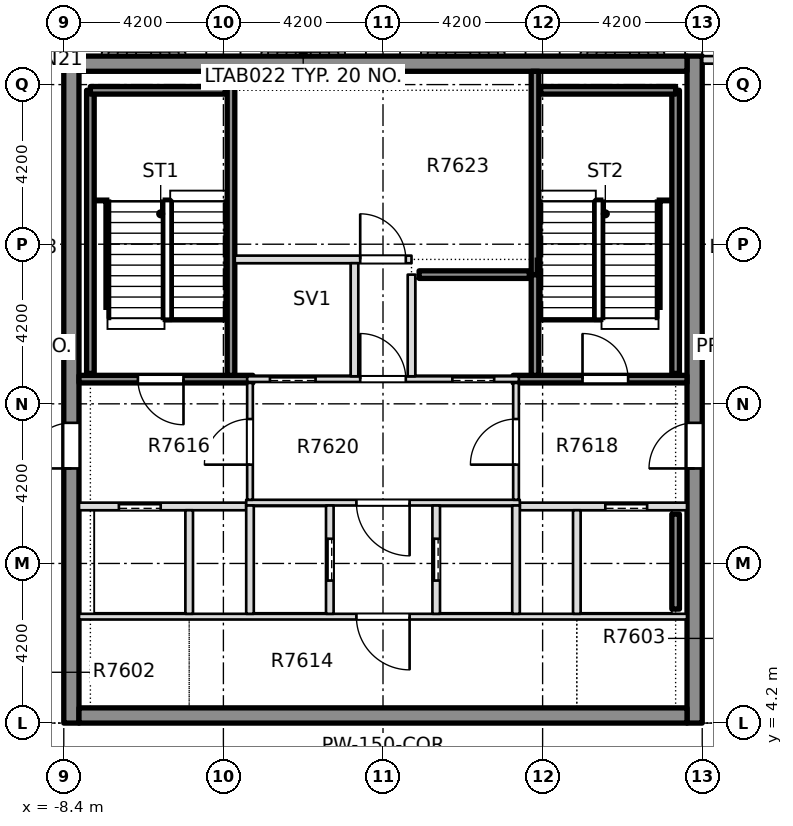
"""IFC4 building model, lengths in metres.
Left out: names, types, materials, properties, quantities, classifications, styles, units other than length and angle.
Written with IfcOpenShell. Run it as: python <this file> out.ifc"""

import sys

from ifc_helpers import new_model, si_unit, direction, frame, frame_2d, origin, place, context, subcontext, project, spatial, rectangle, extrude, element, fill, save


model = new_model("IFC4")
c1 = context("Model", 3, precision=1e-05, world=origin(), true_north=direction((0.0, 1.0)))
c2 = subcontext(c1, "Body", "Model", "MODEL_VIEW")
j1 = project(units=[si_unit("LENGTHUNIT", "METRE"), si_unit("PLANEANGLEUNIT", "RADIAN")], contexts=[c1])
p1 = place(None, origin())
s1 = spatial("IfcSite", under=j1, at=p1, CompositionType="ELEMENT")
p2 = place(p1, origin())
s2 = spatial("IfcBuilding", under=s1, at=p2, CompositionType="ELEMENT")
p3 = place(p2, frame((0.0, 0.0, 293.85)))
s3 = spatial("IfcBuildingStorey", under=s2, at=p3, CompositionType="ELEMENT", Elevation=293.85)
p4 = place(p3, frame((8.2, 4.2, -0.5), z_axis=(0.0, 0.0, 1.0), x_axis=(0.0, 1.0, 0.0)))
e1 = element("IfcWall", 1, at=p4, inside=s3, PredefinedType="SHEAR", context=c2, shape_type="SweptSolid", body=[
    extrude(rectangle(XDim=17.55, YDim=0.4, at=frame_2d((8.775, 0.0))), origin(), (0.0, 0.0, 1.0), 4.5),
])
p5 = place(p4, frame((6.7, 0.0, 0.5)))
e2 = element("IfcOpeningElement", 2, at=p5, cuts=e1, PredefinedType="OPENING", context=c2, shape_type="SweptSolid", body=[
    extrude(rectangle(XDim=1.2, YDim=2.1, at=frame_2d((0.6, 1.05))), frame((0.0, 0.21, 0.0), z_axis=(0.0, -1.0, 0.0), x_axis=(1.0, 0.0, 0.0)), (0.0, 0.0, 1.0), 0.42),
])
p6 = place(p3, frame((-8.2, 4.2, -0.5), z_axis=(0.0, 0.0, 1.0), x_axis=(0.0, 1.0, 0.0)))
e3 = element("IfcWall", 3, at=p6, inside=s3, PredefinedType="SHEAR", context=c2, shape_type="SweptSolid", body=[
    extrude(rectangle(XDim=17.55, YDim=0.4, at=frame_2d((8.775, 0.0))), origin(), (0.0, 0.0, 1.0), 4.5),
])
p7 = place(p6, frame((6.7, 0.0, 0.5)))
e4 = element("IfcOpeningElement", 4, at=p7, cuts=e3, PredefinedType="OPENING", context=c2, shape_type="SweptSolid", body=[
    extrude(rectangle(XDim=1.2, YDim=2.1, at=frame_2d((0.6, 1.05))), frame((0.0, 0.21, 0.0), z_axis=(0.0, -1.0, 0.0), x_axis=(1.0, 0.0, 0.0)), (0.0, 0.0, 1.0), 0.42),
])
for number, where, z_axis, x_axis in (
    (5, (-8.0, 4.4, -0.5), (0.0, 0.0, 1.0), (1.0, 0.0, 0.0)),
    (6, (-8.0, 21.55, -0.5), (0.0, 0.0, 1.0), (1.0, 0.0, 0.0)),
):
    element("IfcWall", number, at=place(p3, frame(where, z_axis=z_axis, x_axis=x_axis)), inside=s3, PredefinedType="SHEAR", context=c2, shape_type="SweptSolid", body=[
        extrude(rectangle(XDim=16.0, YDim=0.4, at=frame_2d((8.0, 0.0))), origin(), (0.0, 0.0, 1.0), 4.5),
    ])
for number, where, z_axis, x_axis in (
    (7, (9.6, 21.65, 0.0), (0.0, 0.0, 1.0), (-1.0, 0.0, 0.0)),
    (8, (-8.4, 21.65, 0.0), (0.0, 0.0, 1.0), (-1.0, 0.0, 0.0)),
):
    element("IfcWall", number, at=place(p3, frame(where, z_axis=z_axis, x_axis=x_axis)), inside=s3, PredefinedType="STANDARD", context=c2, shape_type="SweptSolid", body=[
        extrude(rectangle(XDim=1.2, YDim=0.2, at=frame_2d((0.6, 0.0))), origin(), (0.0, 0.0, 1.0), 4.0),
    ])
p8 = place(p3, frame((-7.999, 7.0, 0.0), z_axis=(0.0, 0.0, 1.0), x_axis=(1.0, 0.0, 0.0)))
e9 = element("IfcWall", 9, at=p8, inside=s3, PredefinedType="PARTITIONING", context=c2, shape_type="SweptSolid", body=[
    extrude(rectangle(XDim=15.998, YDim=0.15, at=frame_2d((7.999, 0.0))), origin(), (0.0, 0.0, 1.0), 4.0),
])
p9 = place(p8, frame((7.299, 0.0, 0.0)))
e10 = element("IfcOpeningElement", 10, at=p9, cuts=e9, PredefinedType="OPENING", context=c2, shape_type="SweptSolid", body=[
    extrude(rectangle(XDim=1.4, YDim=2.1, at=frame_2d((0.7, 1.05))), frame((0.0, 0.085, 0.0), z_axis=(0.0, -1.0, 0.0), x_axis=(1.0, 0.0, 0.0)), (0.0, 0.0, 1.0), 0.17),
])
p10 = place(p3, frame((-7.999, 9.9, 0.0), z_axis=(0.0, 0.0, 1.0), x_axis=(1.0, 0.0, 0.0)))
e11 = element("IfcWall", 11, at=p10, inside=s3, PredefinedType="PARTITIONING", context=c2, shape_type="SweptSolid", body=[
    extrude(rectangle(XDim=4.399, YDim=0.2, at=frame_2d((2.199, 0.0))), origin(), (0.0, 0.0, 1.0), 4.0),
])
p11 = place(p10, frame((1.049, 0.0, 0.0)))
e12 = element("IfcOpeningElement", 12, at=p11, cuts=e11, PredefinedType="OPENING", context=c2, shape_type="SweptSolid", body=[
    extrude(rectangle(XDim=1.1, YDim=2.1, at=frame_2d((0.55, 1.05))), frame((0.0, 0.11, 0.0), z_axis=(0.0, -1.0, 0.0), x_axis=(1.0, 0.0, 0.0)), (0.0, 0.0, 1.0), 0.22),
])
p12 = place(p3, frame((3.6, 9.9, 0.0), z_axis=(0.0, 0.0, 1.0), x_axis=(1.0, 0.0, 0.0)))
e13 = element("IfcWall", 13, at=p12, inside=s3, PredefinedType="PARTITIONING", context=c2, shape_type="SweptSolid", body=[
    extrude(rectangle(XDim=4.399, YDim=0.2, at=frame_2d((2.199, 0.0))), origin(), (0.0, 0.0, 1.0), 4.0),
])
p13 = place(p12, frame((2.25, 0.0, 0.0)))
e14 = element("IfcOpeningElement", 14, at=p13, cuts=e13, PredefinedType="OPENING", context=c2, shape_type="SweptSolid", body=[
    extrude(rectangle(XDim=1.1, YDim=2.1, at=frame_2d((0.55, 1.05))), frame((0.0, 0.11, 0.0), z_axis=(0.0, -1.0, 0.0), x_axis=(1.0, 0.0, 0.0)), (0.0, 0.0, 1.0), 0.22),
])
p14 = place(p3, frame((-3.6, 10.0, 0.0), z_axis=(0.0, 0.0, 1.0), x_axis=(1.0, 0.0, 0.0)))
e15 = element("IfcWall", 15, at=p14, inside=s3, PredefinedType="PARTITIONING", context=c2, shape_type="SweptSolid", body=[
    extrude(rectangle(XDim=7.2, YDim=0.15, at=frame_2d((3.6, 0.0))), origin(), (0.0, 0.0, 1.0), 4.0),
])
p15 = place(p14, frame((2.9, 0.0, 0.0)))
e16 = element("IfcOpeningElement", 16, at=p15, cuts=e15, PredefinedType="OPENING", context=c2, shape_type="SweptSolid", body=[
    extrude(rectangle(XDim=1.4, YDim=2.1, at=frame_2d((0.7, 1.05))), frame((0.0, 0.085, 0.0), z_axis=(0.0, -1.0, 0.0), x_axis=(1.0, 0.0, 0.0)), (0.0, 0.0, 1.0), 0.17),
])
p16 = place(p3, frame((-7.999, 13.25, 0.0), z_axis=(0.0, 0.0, 1.0), x_axis=(1.0, 0.0, 0.0)))
e17 = element("IfcWall", 17, at=p16, inside=s3, PredefinedType="SOLIDWALL", context=c2, shape_type="SweptSolid", body=[
    extrude(rectangle(XDim=4.574, YDim=0.2, at=frame_2d((2.287, 0.0))), origin(), (0.0, 0.0, 1.0), 4.0),
])
p17 = place(p16, frame((1.549, 0.0, 0.0)))
e18 = element("IfcOpeningElement", 18, at=p17, cuts=e17, PredefinedType="OPENING", context=c2, shape_type="SweptSolid", body=[
    extrude(rectangle(XDim=1.2, YDim=2.1, at=frame_2d((0.6, 1.05))), frame((0.0, 0.11, 0.0), z_axis=(0.0, -1.0, 0.0), x_axis=(1.0, 0.0, 0.0)), (0.0, 0.0, 1.0), 0.22),
])
p18 = place(p3, frame((-3.575, 13.25, 0.0), z_axis=(0.0, 0.0, 1.0), x_axis=(1.0, 0.0, 0.0)))
e19 = element("IfcWall", 19, at=p18, inside=s3, PredefinedType="PARTITIONING", context=c2, shape_type="SweptSolid", body=[
    extrude(rectangle(XDim=7.15, YDim=0.15, at=frame_2d((3.575, 0.0))), origin(), (0.0, 0.0, 1.0), 4.0),
])
p19 = place(p18, frame((0.6, 0.0, 0.0)))
e20 = element("IfcOpeningElement", 20, at=p19, cuts=e19, PredefinedType="OPENING", context=c2, shape_type="SweptSolid", body=[
    extrude(rectangle(XDim=1.2, YDim=2.1, at=frame_2d((0.6, 1.05))), frame((0.0, 0.085, 0.0), z_axis=(0.0, -1.0, 0.0), x_axis=(1.0, 0.0, 0.0)), (0.0, 0.0, 1.0), 0.17),
])
p20 = place(p18, frame((5.4, 0.0, 0.0)))
e21 = element("IfcOpeningElement", 21, at=p20, cuts=e19, PredefinedType="OPENING", context=c2, shape_type="SweptSolid", body=[
    extrude(rectangle(XDim=1.1, YDim=2.1, at=frame_2d((0.55, 1.05))), frame((0.0, 0.085, 0.0), z_axis=(0.0, -1.0, 0.0), x_axis=(1.0, 0.0, 0.0)), (0.0, 0.0, 1.0), 0.17),
])
p21 = place(p18, frame((2.975, 0.0, 0.0)))
e22 = element("IfcOpeningElement", 22, at=p21, cuts=e19, PredefinedType="OPENING", context=c2, shape_type="SweptSolid", body=[
    extrude(rectangle(XDim=1.2, YDim=2.1, at=frame_2d((0.6, 1.05))), frame((0.0, 0.085, 0.0), z_axis=(0.0, -1.0, 0.0), x_axis=(1.0, 0.0, 0.0)), (0.0, 0.0, 1.0), 0.17),
])
p22 = place(p3, frame((3.425, 13.25, 0.0), z_axis=(0.0, 0.0, 1.0), x_axis=(1.0, 0.0, 0.0)))
e23 = element("IfcWall", 23, at=p22, inside=s3, PredefinedType="SOLIDWALL", context=c2, shape_type="SweptSolid", body=[
    extrude(rectangle(XDim=4.574, YDim=0.2, at=frame_2d((2.287, 0.0))), origin(), (0.0, 0.0, 1.0), 4.0),
])
p23 = place(p22, frame((1.825, 0.0, 0.0)))
e24 = element("IfcOpeningElement", 24, at=p23, cuts=e23, PredefinedType="OPENING", context=c2, shape_type="SweptSolid", body=[
    extrude(rectangle(XDim=1.2, YDim=2.1, at=frame_2d((0.6, 1.05))), frame((0.0, 0.11, 0.0), z_axis=(0.0, -1.0, 0.0), x_axis=(1.0, 0.0, 0.0)), (0.0, 0.0, 1.0), 0.22),
])
p24 = place(p3, frame((-3.9, 16.4, 0.0), z_axis=(0.0, 0.0, 1.0), x_axis=(1.0, 0.0, 0.0)))
e25 = element("IfcWall", 25, at=p24, inside=s3, PredefinedType="PARTITIONING", context=c2, shape_type="SweptSolid", body=[
    extrude(rectangle(XDim=4.65, YDim=0.2, at=frame_2d((2.325, 0.0))), origin(), (0.0, 0.0, 1.0), 4.0),
])
p25 = place(p24, frame((3.3, 0.0, 0.0)))
e26 = element("IfcOpeningElement", 26, at=p25, cuts=e25, PredefinedType="OPENING", context=c2, shape_type="SweptSolid", body=[
    extrude(rectangle(XDim=1.2, YDim=2.1, at=frame_2d((0.6, 1.05))), frame((0.0, 0.11, 0.0), z_axis=(0.0, -1.0, 0.0), x_axis=(1.0, 0.0, 0.0)), (0.0, 0.0, 1.0), 0.22),
])
p26 = place(p3, frame((-5.1, 7.075, 0.0), z_axis=(0.0, 0.0, 1.0), x_axis=(0.0, 1.0, 0.0)))
e27 = element("IfcWall", 27, at=p26, inside=s3, PredefinedType="PARTITIONING", context=c2, shape_type="SweptSolid", body=[
    extrude(rectangle(XDim=2.725, YDim=0.2, at=frame_2d((1.363, 0.0))), origin(), (0.0, 0.0, 1.0), 4.0),
])
p27 = place(p3, frame((-4.0, 13.35, 0.0), z_axis=(0.0, 0.0, 1.0), x_axis=(0.0, 1.0, 0.0)))
e28 = element("IfcWall", 28, at=p27, inside=s3, PredefinedType="SOLIDWALL", context=c2, shape_type="SweptSolid", body=[
    extrude(rectangle(XDim=7.999, YDim=0.2, at=frame_2d((4.0, 0.0))), origin(), (0.0, 0.0, 1.0), 4.0),
])
p28 = place(p3, frame((-3.5, 7.075, 0.0), z_axis=(0.0, 0.0, 1.0), x_axis=(0.0, 1.0, 0.0)))
e29 = element("IfcWall", 29, at=p28, inside=s3, PredefinedType="PARTITIONING", context=c2, shape_type="SweptSolid", body=[
    extrude(rectangle(XDim=2.85, YDim=0.2, at=frame_2d((1.425, 0.0))), origin(), (0.0, 0.0, 1.0), 4.0),
])
p29 = place(p3, frame((-3.5, 10.075, 0.0), z_axis=(0.0, 0.0, 1.0), x_axis=(0.0, 1.0, 0.0)))
e30 = element("IfcWall", 30, at=p29, inside=s3, PredefinedType="PARTITIONING", context=c2, shape_type="SweptSolid", body=[
    extrude(rectangle(XDim=3.075, YDim=0.15, at=frame_2d((1.538, 0.0))), origin(), (0.0, 0.0, 1.0), 4.0),
])
p30 = place(p29, frame((0.925, 0.0, 0.0)))
e31 = element("IfcOpeningElement", 31, at=p30, cuts=e30, PredefinedType="OPENING", context=c2, shape_type="SweptSolid", body=[
    extrude(rectangle(XDim=1.2, YDim=2.1, at=frame_2d((0.6, 1.05))), frame((0.0, 0.085, 0.0), z_axis=(0.0, -1.0, 0.0), x_axis=(1.0, 0.0, 0.0)), (0.0, 0.0, 1.0), 0.17),
])
p31 = place(p3, frame((-1.4, 7.075, 0.0), z_axis=(0.0, 0.0, 1.0), x_axis=(0.0, 1.0, 0.0)))
e32 = element("IfcWall", 32, at=p31, inside=s3, PredefinedType="PARTITIONING", context=c2, shape_type="SweptSolid", body=[
    extrude(rectangle(XDim=2.85, YDim=0.2, at=frame_2d((1.425, 0.0))), origin(), (0.0, 0.0, 1.0), 4.0),
])
p32 = place(p31, frame((0.875, 0.0, 0.0)))
e33 = element("IfcOpeningElement", 33, at=p32, cuts=e32, PredefinedType="OPENING", context=c2, shape_type="SweptSolid", body=[
    extrude(rectangle(XDim=1.1, YDim=2.1, at=frame_2d((0.55, 1.05))), frame((0.0, 0.11, 0.0), z_axis=(0.0, -1.0, 0.0), x_axis=(1.0, 0.0, 0.0)), (0.0, 0.0, 1.0), 0.22),
])
p33 = place(p3, frame((-0.75, 13.325, 0.0), z_axis=(0.0, 0.0, 1.0), x_axis=(0.0, 1.0, 0.0)))
e34 = element("IfcWall", 34, at=p33, inside=s3, PredefinedType="PARTITIONING", context=c2, shape_type="SweptSolid", body=[
    extrude(rectangle(XDim=2.975, YDim=0.2, at=frame_2d((1.488, 0.0))), origin(), (0.0, 0.0, 1.0), 4.0),
])
p34 = place(p3, frame((0.75, 13.325, 0.0), z_axis=(0.0, 0.0, 1.0), x_axis=(0.0, 1.0, 0.0)))
e35 = element("IfcWall", 35, at=p34, inside=s3, PredefinedType="PARTITIONING", context=c2, shape_type="SweptSolid", body=[
    extrude(rectangle(XDim=2.675, YDim=0.2, at=frame_2d((1.337, 0.0))), origin(), (0.0, 0.0, 1.0), 4.0),
])
p35 = place(p3, frame((1.4, 7.075, 0.0), z_axis=(0.0, 0.0, 1.0), x_axis=(0.0, 1.0, 0.0)))
e36 = element("IfcWall", 36, at=p35, inside=s3, PredefinedType="PARTITIONING", context=c2, shape_type="SweptSolid", body=[
    extrude(rectangle(XDim=2.85, YDim=0.2, at=frame_2d((1.425, 0.0))), origin(), (0.0, 0.0, 1.0), 4.0),
])
p36 = place(p35, frame((0.875, 0.0, 0.0)))
e37 = element("IfcOpeningElement", 37, at=p36, cuts=e36, PredefinedType="OPENING", context=c2, shape_type="SweptSolid", body=[
    extrude(rectangle(XDim=1.1, YDim=2.1, at=frame_2d((0.55, 1.05))), frame((0.0, 0.11, 0.0), z_axis=(0.0, -1.0, 0.0), x_axis=(1.0, 0.0, 0.0)), (0.0, 0.0, 1.0), 0.22),
])
p37 = place(p3, frame((3.5, 7.075, 0.0), z_axis=(0.0, 0.0, 1.0), x_axis=(0.0, 1.0, 0.0)))
e38 = element("IfcWall", 38, at=p37, inside=s3, PredefinedType="PARTITIONING", context=c2, shape_type="SweptSolid", body=[
    extrude(rectangle(XDim=2.85, YDim=0.2, at=frame_2d((1.425, 0.0))), origin(), (0.0, 0.0, 1.0), 4.0),
])
p38 = place(p3, frame((3.5, 10.075, 0.0), z_axis=(0.0, 0.0, 1.0), x_axis=(0.0, 1.0, 0.0)))
e39 = element("IfcWall", 39, at=p38, inside=s3, PredefinedType="PARTITIONING", context=c2, shape_type="SweptSolid", body=[
    extrude(rectangle(XDim=3.075, YDim=0.15, at=frame_2d((1.538, 0.0))), origin(), (0.0, 0.0, 1.0), 4.0),
])
p39 = place(p38, frame((0.925, 0.0, 0.0)))
e40 = element("IfcOpeningElement", 40, at=p39, cuts=e39, PredefinedType="OPENING", context=c2, shape_type="SweptSolid", body=[
    extrude(rectangle(XDim=1.2, YDim=2.1, at=frame_2d((0.6, 1.05))), frame((0.0, 0.085, 0.0), z_axis=(0.0, -1.0, 0.0), x_axis=(1.0, 0.0, 0.0)), (0.0, 0.0, 1.0), 0.17),
])
p40 = place(p3, frame((4.0, 13.35, 0.0), z_axis=(0.0, 0.0, 1.0), x_axis=(0.0, 1.0, 0.0)))
e41 = element("IfcWall", 41, at=p40, inside=s3, PredefinedType="SOLIDWALL", context=c2, shape_type="SweptSolid", body=[
    extrude(rectangle(XDim=2.65, YDim=0.2, at=frame_2d((1.325, 0.0))), origin(), (0.0, 0.0, 1.0), 4.0),
])
p41 = place(p3, frame((4.0, 16.0, 0.0), z_axis=(0.0, 0.0, 1.0), x_axis=(0.0, 1.0, 0.0)))
e42 = element("IfcWall", 42, at=p41, inside=s3, PredefinedType="SOLIDWALL", context=c2, shape_type="SweptSolid", body=[
    extrude(rectangle(XDim=5.349, YDim=0.2, at=frame_2d((2.675, 0.0))), origin(), (0.0, 0.0, 1.0), 4.0),
])
p42 = place(p3, frame((5.1, 7.075, 0.0), z_axis=(0.0, 0.0, 1.0), x_axis=(0.0, 1.0, 0.0)))
e43 = element("IfcWall", 43, at=p42, inside=s3, PredefinedType="PARTITIONING", context=c2, shape_type="SweptSolid", body=[
    extrude(rectangle(XDim=2.725, YDim=0.2, at=frame_2d((1.363, 0.0))), origin(), (0.0, 0.0, 1.0), 4.0),
])
p43 = place(p3, frame((-7.7, 13.4, 0.0), z_axis=(0.0, 0.0, 1.0), x_axis=(0.0, 1.0, 0.0)))
e44 = element("IfcWall", 44, at=p43, inside=s3, PredefinedType="SOLIDWALL", context=c2, shape_type="SweptSolid", body=[
    extrude(rectangle(XDim=7.45, YDim=0.2, at=frame_2d((3.725, 0.0))), origin(), (0.0, 0.0, 1.0), 4.0),
])
p44 = place(p3, frame((-7.7, 20.85, 0.0), z_axis=(0.0, 0.0, 1.0), x_axis=(1.0, 0.0, 0.0)))
e45 = element("IfcWall", 45, at=p44, inside=s3, PredefinedType="SOLIDWALL", context=c2, shape_type="SweptSolid", body=[
    extrude(rectangle(XDim=3.55, YDim=0.2, at=frame_2d((1.775, 0.0))), origin(), (0.0, 0.0, 1.0), 4.0),
])
p45 = place(p3, frame((7.7, 13.4, 0.0), z_axis=(0.0, 0.0, 1.0), x_axis=(0.0, 1.0, 0.0)))
e46 = element("IfcWall", 46, at=p45, inside=s3, PredefinedType="SOLIDWALL", context=c2, shape_type="SweptSolid", body=[
    extrude(rectangle(XDim=7.45, YDim=0.2, at=frame_2d((3.725, 0.0))), origin(), (0.0, 0.0, 1.0), 4.0),
])
p46 = place(p3, frame((4.15, 20.85, 0.0), z_axis=(0.0, 0.0, 1.0), x_axis=(1.0, 0.0, 0.0)))
e47 = element("IfcWall", 47, at=p46, inside=s3, PredefinedType="SOLIDWALL", context=c2, shape_type="SweptSolid", body=[
    extrude(rectangle(XDim=3.55, YDim=0.2, at=frame_2d((1.775, 0.0))), origin(), (0.0, 0.0, 1.0), 4.0),
])
p47 = place(p3, frame((7.7, 9.7, 0.0), z_axis=(0.0, 0.0, 1.0), x_axis=(0.0, -1.0, 0.0)))
e48 = element("IfcWall", 48, at=p47, inside=s3, PredefinedType="SOLIDWALL", context=c2, shape_type="SweptSolid", body=[
    extrude(rectangle(XDim=2.5, YDim=0.2, at=frame_2d((1.25, 0.0))), origin(), (0.0, 0.0, 1.0), 4.0),
])
p48 = place(p3, frame((0.95, 16.0, 0.0), z_axis=(0.0, 0.0, 1.0), x_axis=(1.0, 0.0, 0.0)))
e49 = element("IfcWall", 49, at=p48, inside=s3, PredefinedType="SOLIDWALL", context=c2, shape_type="SweptSolid", body=[
    extrude(rectangle(XDim=2.9, YDim=0.2, at=frame_2d((1.45, 0.0))), origin(), (0.0, 0.0, 1.0), 4.0),
])
p49 = place(p17, origin())
e50 = element("IfcDoor", 50, at=p49, inside=s3, OperationType="SINGLE_SWING_LEFT", PredefinedType="DOOR", context=c2, shape_type="SweptSolid", body=[
    extrude(rectangle(XDim=1.2, YDim=2.1, at=frame_2d((0.6, 1.05))), frame((0.0, 0.025, 0.0), z_axis=(0.0, -1.0, 0.0), x_axis=(1.0, 0.0, 0.0)), (0.0, 0.0, 1.0), 0.05),
])
fill(e18, e50)
p50 = place(p11, origin())
e51 = element("IfcDoor", 51, at=p50, inside=s3, OperationType="SLIDING_TO_LEFT", PredefinedType="DOOR", context=c2, shape_type="SweptSolid", body=[
    extrude(rectangle(XDim=1.1, YDim=2.1, at=frame_2d((0.55, 1.05))), frame((0.0, 0.025, 0.0), z_axis=(0.0, -1.0, 0.0), x_axis=(1.0, 0.0, 0.0)), (0.0, 0.0, 1.0), 0.05),
])
fill(e12, e51)
p51 = place(p23, origin())
e52 = element("IfcDoor", 52, at=p51, inside=s3, OperationType="SINGLE_SWING_RIGHT", PredefinedType="DOOR", context=c2, shape_type="SweptSolid", body=[
    extrude(rectangle(XDim=1.2, YDim=2.1, at=frame_2d((0.6, 1.05))), frame((0.0, 0.025, 0.0), z_axis=(0.0, -1.0, 0.0), x_axis=(1.0, 0.0, 0.0)), (0.0, 0.0, 1.0), 0.05),
])
fill(e24, e52)
p52 = place(p13, origin())
e53 = element("IfcDoor", 53, at=p52, inside=s3, OperationType="SLIDING_TO_LEFT", PredefinedType="DOOR", context=c2, shape_type="SweptSolid", body=[
    extrude(rectangle(XDim=1.1, YDim=2.1, at=frame_2d((0.55, 1.05))), frame((0.0, 0.025, 0.0), z_axis=(0.0, -1.0, 0.0), x_axis=(1.0, 0.0, 0.0)), (0.0, 0.0, 1.0), 0.05),
])
fill(e14, e53)
p53 = place(p9, origin())
e54 = element("IfcDoor", 54, at=p53, inside=s3, OperationType="SINGLE_SWING_RIGHT", PredefinedType="DOOR", context=c2, shape_type="SweptSolid", body=[
    extrude(rectangle(XDim=1.4, YDim=2.1, at=frame_2d((0.7, 1.05))), frame((0.0, 0.025, 0.0), z_axis=(0.0, -1.0, 0.0), x_axis=(1.0, 0.0, 0.0)), (0.0, 0.0, 1.0), 0.05),
])
fill(e10, e54)
p54 = place(p15, origin())
e55 = element("IfcDoor", 55, at=p54, inside=s3, OperationType="SINGLE_SWING_RIGHT", PredefinedType="DOOR", context=c2, shape_type="SweptSolid", body=[
    extrude(rectangle(XDim=1.4, YDim=2.1, at=frame_2d((0.7, 1.05))), frame((0.0, 0.025, 0.0), z_axis=(0.0, -1.0, 0.0), x_axis=(1.0, 0.0, 0.0)), (0.0, 0.0, 1.0), 0.05),
])
fill(e16, e55)
p55 = place(p32, origin())
e56 = element("IfcDoor", 56, at=p55, inside=s3, OperationType="SLIDING_TO_RIGHT", PredefinedType="DOOR", context=c2, shape_type="SweptSolid", body=[
    extrude(rectangle(XDim=1.1, YDim=2.1, at=frame_2d((0.55, 1.05))), frame((0.0, 0.025, 0.0), z_axis=(0.0, -1.0, 0.0), x_axis=(1.0, 0.0, 0.0)), (0.0, 0.0, 1.0), 0.05),
])
fill(e33, e56)
p56 = place(p36, origin())
e57 = element("IfcDoor", 57, at=p56, inside=s3, OperationType="SLIDING_TO_RIGHT", PredefinedType="DOOR", context=c2, shape_type="SweptSolid", body=[
    extrude(rectangle(XDim=1.1, YDim=2.1, at=frame_2d((0.55, 1.05))), frame((0.0, 0.025, 0.0), z_axis=(0.0, -1.0, 0.0), x_axis=(1.0, 0.0, 0.0)), (0.0, 0.0, 1.0), 0.05),
])
fill(e37, e57)
p57 = place(p19, origin())
e58 = element("IfcDoor", 58, at=p57, inside=s3, OperationType="SLIDING_TO_RIGHT", PredefinedType="DOOR", context=c2, shape_type="SweptSolid", body=[
    extrude(rectangle(XDim=1.2, YDim=2.1, at=frame_2d((0.6, 1.05))), frame((0.0, 0.025, 0.0), z_axis=(0.0, -1.0, 0.0), x_axis=(1.0, 0.0, 0.0)), (0.0, 0.0, 1.0), 0.05),
])
fill(e20, e58)
p58 = place(p20, origin())
e59 = element("IfcDoor", 59, at=p58, inside=s3, OperationType="SLIDING_TO_LEFT", PredefinedType="DOOR", context=c2, shape_type="SweptSolid", body=[
    extrude(rectangle(XDim=1.1, YDim=2.1, at=frame_2d((0.55, 1.05))), frame((0.0, 0.025, 0.0), z_axis=(0.0, -1.0, 0.0), x_axis=(1.0, 0.0, 0.0)), (0.0, 0.0, 1.0), 0.05),
])
fill(e21, e59)
p59 = place(p21, origin())
e60 = element("IfcDoor", 60, at=p59, inside=s3, OperationType="SINGLE_SWING_RIGHT", PredefinedType="DOOR", context=c2, shape_type="SweptSolid", body=[
    extrude(rectangle(XDim=1.2, YDim=2.1, at=frame_2d((0.6, 1.05))), frame((0.0, 0.025, 0.0), z_axis=(0.0, -1.0, 0.0), x_axis=(1.0, 0.0, 0.0)), (0.0, 0.0, 1.0), 0.05),
])
fill(e22, e60)
p60 = place(p25, origin())
e61 = element("IfcDoor", 61, at=p60, inside=s3, OperationType="SINGLE_SWING_RIGHT", PredefinedType="DOOR", context=c2, shape_type="SweptSolid", body=[
    extrude(rectangle(XDim=1.2, YDim=2.1, at=frame_2d((0.6, 1.05))), frame((0.0, 0.025, 0.0), z_axis=(0.0, -1.0, 0.0), x_axis=(1.0, 0.0, 0.0)), (0.0, 0.0, 1.0), 0.05),
])
fill(e26, e61)
p61 = place(p30, origin())
e62 = element("IfcDoor", 62, at=p61, inside=s3, OperationType="SINGLE_SWING_RIGHT", PredefinedType="DOOR", context=c2, shape_type="SweptSolid", body=[
    extrude(rectangle(XDim=1.2, YDim=2.1, at=frame_2d((0.6, 1.05))), frame((0.0, 0.025, 0.0), z_axis=(0.0, -1.0, 0.0), x_axis=(1.0, 0.0, 0.0)), (0.0, 0.0, 1.0), 0.05),
])
fill(e31, e62)
p62 = place(p39, origin())
e63 = element("IfcDoor", 63, at=p62, inside=s3, OperationType="SINGLE_SWING_LEFT", PredefinedType="DOOR", context=c2, shape_type="SweptSolid", body=[
    extrude(rectangle(XDim=1.2, YDim=2.1, at=frame_2d((0.6, 1.05))), frame((0.0, 0.025, 0.0), z_axis=(0.0, -1.0, 0.0), x_axis=(1.0, 0.0, 0.0)), (0.0, 0.0, 1.0), 0.05),
])
fill(e40, e63)
p63 = place(p7, origin())
e64 = element("IfcDoor", 64, at=p63, inside=s3, OperationType="SINGLE_SWING_LEFT", PredefinedType="DOOR", context=c2, shape_type="SweptSolid", body=[
    extrude(rectangle(XDim=1.2, YDim=2.1, at=frame_2d((0.6, 1.05))), frame((0.0, 0.025, 0.0), z_axis=(0.0, -1.0, 0.0), x_axis=(1.0, 0.0, 0.0)), (0.0, 0.0, 1.0), 0.05),
])
fill(e4, e64)
p64 = place(p5, origin())
e65 = element("IfcDoor", 65, at=p64, inside=s3, OperationType="SINGLE_SWING_LEFT", PredefinedType="DOOR", context=c2, shape_type="SweptSolid", body=[
    extrude(rectangle(XDim=1.2, YDim=2.1, at=frame_2d((0.6, 1.05))), frame((0.0, 0.025, 0.0), z_axis=(0.0, -1.0, 0.0), x_axis=(1.0, 0.0, 0.0)), (0.0, 0.0, 1.0), 0.05),
])
fill(e2, e65)
save(model, sys.argv[1])
